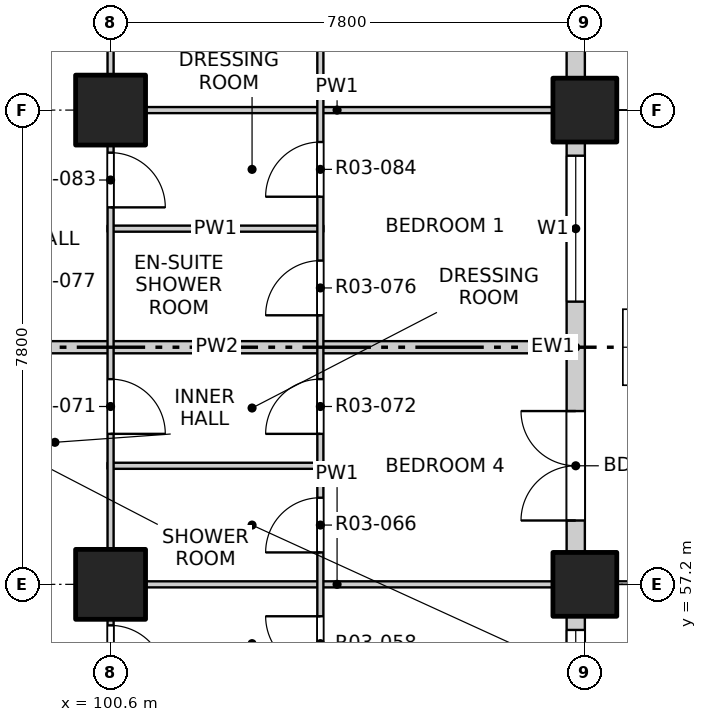
"""IFC4 building model, lengths in metres.
Left out: names, types, materials, properties, quantities, classifications, styles, units other than length and angle.
Written with IfcOpenShell. Run it as: python <this file> out.ifc"""

import sys

from ifc_helpers import new_model, si_unit, direction, frame, frame_2d, origin, origin_2d, place, context, subcontext, project, spatial, rectangle, extrude, element, fill, save


model = new_model("IFC4")
c1 = context("Model", 3, precision=1e-05, world=origin(), true_north=direction((0.0, 1.0)))
c2 = subcontext(c1, "Body", "Model", "MODEL_VIEW")
j1 = project(units=[si_unit("LENGTHUNIT", "METRE"), si_unit("PLANEANGLEUNIT", "RADIAN")], contexts=[c1])
p1 = place(None, origin())
s1 = spatial("IfcSite", under=j1, at=p1, CompositionType="ELEMENT")
p2 = place(p1, origin())
s2 = spatial("IfcBuilding", under=s1, at=p2, CompositionType="ELEMENT")
p3 = place(p2, frame((0.0, 0.0, 43.3)))
s3 = spatial("IfcBuildingStorey", under=s2, at=p3, CompositionType="ELEMENT", Elevation=43.3)
for number, where, z_axis, x_axis in (
    (1, (108.4, 57.2, -0.25), (0.0, 0.0, 1.0), (1.0, 0.0, 0.0)),
    (2, (108.4, 65.0, -0.25), (0.0, 0.0, 1.0), (1.0, 0.0, 0.0)),
):
    element("IfcColumn", number, at=place(p3, frame(where, z_axis=z_axis, x_axis=x_axis)), inside=s3, PredefinedType="COLUMN", context=c2, shape_type="SweptSolid", body=[
        extrude(rectangle(XDim=1.05, YDim=1.05, at=origin_2d()), origin(), (0.0, 0.0, 1.0), 3.35),
    ])
for number, where, z_axis, x_axis in (
    (3, (100.6, 57.2, -0.25), (0.0, 0.0, 1.0), (1.0, 0.0, 0.0)),
    (4, (100.6, 65.0, -0.25), (0.0, 0.0, 1.0), (1.0, 0.0, 0.0)),
):
    element("IfcColumn", number, at=place(p3, frame(where, z_axis=z_axis, x_axis=x_axis)), inside=s3, PredefinedType="COLUMN", context=c2, shape_type="SweptSolid", body=[
        extrude(rectangle(XDim=1.15, YDim=1.15, at=origin_2d()), origin(), (0.0, 0.0, 1.0), 3.35),
    ])
p4 = place(p3, frame((108.25, 49.925, 0.0), z_axis=(0.0, 0.0, 1.0), x_axis=(0.0, 1.0, 0.0)))
e5 = element("IfcWall", 5, at=p4, inside=s3, PredefinedType="SOLIDWALL", context=c2, shape_type="SweptSolid", body=[
    extrude(rectangle(XDim=6.75, YDim=0.3, at=frame_2d((3.375, 0.0))), origin(), (0.0, 0.0, 1.0), 3.1),
])
p5 = place(p4, frame((0.225, 0.0, 0.9)))
e6 = element("IfcOpeningElement", 6, at=p5, cuts=e5, PredefinedType="OPENING", context=c2, shape_type="SweptSolid", body=[
    extrude(rectangle(XDim=2.4, YDim=1.8, at=frame_2d((1.2, 0.9))), frame((0.0, 0.16, 0.0), z_axis=(0.0, -1.0, 0.0), x_axis=(1.0, 0.0, 0.0)), (0.0, 0.0, 1.0), 0.32),
])
p6 = place(p4, frame((4.125, 0.0, 0.9)))
e7 = element("IfcOpeningElement", 7, at=p6, cuts=e5, PredefinedType="OPENING", context=c2, shape_type="SweptSolid", body=[
    extrude(rectangle(XDim=2.4, YDim=1.8, at=frame_2d((1.2, 0.9))), frame((0.0, 0.16, 0.0), z_axis=(0.0, -1.0, 0.0), x_axis=(1.0, 0.0, 0.0)), (0.0, 0.0, 1.0), 0.32),
])
p7 = place(p3, frame((108.25, 57.725, 0.0), z_axis=(0.0, 0.0, 1.0), x_axis=(0.0, 1.0, 0.0)))
e8 = element("IfcWall", 8, at=p7, inside=s3, PredefinedType="SOLIDWALL", context=c2, shape_type="SweptSolid", body=[
    extrude(rectangle(XDim=6.75, YDim=0.3, at=frame_2d((3.375, 0.0))), origin(), (0.0, 0.0, 1.0), 3.1),
])
p8 = place(p7, frame((0.525, 0.0, 0.0)))
e9 = element("IfcOpeningElement", 9, at=p8, cuts=e8, PredefinedType="OPENING", context=c2, shape_type="SweptSolid", body=[
    extrude(rectangle(XDim=1.8, YDim=2.4, at=frame_2d((0.9, 1.2))), frame((0.0, 0.16, 0.0), z_axis=(0.0, -1.0, 0.0), x_axis=(1.0, 0.0, 0.0)), (0.0, 0.0, 1.0), 0.32),
])
p9 = place(p7, frame((4.125, 0.0, 0.9)))
e10 = element("IfcOpeningElement", 10, at=p9, cuts=e8, PredefinedType="OPENING", context=c2, shape_type="SweptSolid", body=[
    extrude(rectangle(XDim=2.4, YDim=1.8, at=frame_2d((1.2, 0.9))), frame((0.0, 0.16, 0.0), z_axis=(0.0, -1.0, 0.0), x_axis=(1.0, 0.0, 0.0)), (0.0, 0.0, 1.0), 0.32),
])
p10 = place(p3, frame((108.25, 65.525, 0.0), z_axis=(0.0, 0.0, 1.0), x_axis=(0.0, 1.0, 0.0)))
e11 = element("IfcWall", 11, at=p10, inside=s3, PredefinedType="SOLIDWALL", context=c2, shape_type="SweptSolid", body=[
    extrude(rectangle(XDim=6.75, YDim=0.3, at=frame_2d((3.375, 0.0))), origin(), (0.0, 0.0, 1.0), 3.1),
])
p11 = place(p10, frame((0.525, 0.0, 0.0)))
e12 = element("IfcOpeningElement", 12, at=p11, cuts=e11, PredefinedType="OPENING", context=c2, shape_type="SweptSolid", body=[
    extrude(rectangle(XDim=1.8, YDim=2.4, at=frame_2d((0.9, 1.2))), frame((0.0, 0.16, 0.0), z_axis=(0.0, -1.0, 0.0), x_axis=(1.0, 0.0, 0.0)), (0.0, 0.0, 1.0), 0.32),
])
p12 = place(p10, frame((4.125, 0.0, 0.9)))
e13 = element("IfcOpeningElement", 13, at=p12, cuts=e11, PredefinedType="OPENING", context=c2, shape_type="SweptSolid", body=[
    extrude(rectangle(XDim=2.4, YDim=1.8, at=frame_2d((1.2, 0.9))), frame((0.0, 0.16, 0.0), z_axis=(0.0, -1.0, 0.0), x_axis=(1.0, 0.0, 0.0)), (0.0, 0.0, 1.0), 0.32),
])
p13 = place(p3, frame((100.55, 57.2, 0.0), z_axis=(0.0, 0.0, 1.0), x_axis=(1.0, 0.0, 0.0)))
e14 = element("IfcWall", 14, at=p13, inside=s3, PredefinedType="PARTITIONING", context=c2, shape_type="SweptSolid", body=[
    extrude(rectangle(XDim=7.55, YDim=0.1, at=frame_2d((3.775, 0.0))), origin(), (0.0, 0.0, 1.0), 3.1),
])
p14 = place(p3, frame((100.55, 59.15, 0.0), z_axis=(0.0, 0.0, 1.0), x_axis=(1.0, 0.0, 0.0)))
e15 = element("IfcWall", 15, at=p14, inside=s3, PredefinedType="PARTITIONING", context=c2, shape_type="SweptSolid", body=[
    extrude(rectangle(XDim=3.55, YDim=0.1, at=frame_2d((1.775, 0.0))), origin(), (0.0, 0.0, 1.0), 3.1),
])
p15 = place(p3, frame((96.6, 61.1, 0.0), z_axis=(0.0, 0.0, 1.0), x_axis=(1.0, 0.0, 0.0)))
e16 = element("IfcWall", 16, at=p15, inside=s3, PredefinedType="PARTITIONING", context=c2, shape_type="SweptSolid", body=[
    extrude(rectangle(XDim=11.5, YDim=0.2, at=frame_2d((5.75, 0.0))), origin(), (0.0, 0.0, 1.0), 3.1),
])
p16 = place(p3, frame((100.55, 63.05, 0.0), z_axis=(0.0, 0.0, 1.0), x_axis=(1.0, 0.0, 0.0)))
e17 = element("IfcWall", 17, at=p16, inside=s3, PredefinedType="PARTITIONING", context=c2, shape_type="SweptSolid", body=[
    extrude(rectangle(XDim=3.55, YDim=0.1, at=frame_2d((1.775, 0.0))), origin(), (0.0, 0.0, 1.0), 3.1),
])
p17 = place(p3, frame((100.55, 65.0, 0.0), z_axis=(0.0, 0.0, 1.0), x_axis=(1.0, 0.0, 0.0)))
e18 = element("IfcWall", 18, at=p17, inside=s3, PredefinedType="PARTITIONING", context=c2, shape_type="SweptSolid", body=[
    extrude(rectangle(XDim=7.55, YDim=0.1, at=frame_2d((3.775, 0.0))), origin(), (0.0, 0.0, 1.0), 3.1),
])
p18 = place(p3, frame((100.6, 41.9, 0.0), z_axis=(0.0, 0.0, 1.0), x_axis=(0.0, 1.0, 0.0)))
e19 = element("IfcWall", 19, at=p18, inside=s3, PredefinedType="PARTITIONING", context=c2, shape_type="SweptSolid", body=[
    extrude(rectangle(XDim=46.2, YDim=0.1, at=frame_2d((23.1, 0.0))), origin(), (0.0, 0.0, 1.0), 3.1),
])
p19 = place(p18, frame((1.2, 0.0, 0.0)))
e20 = element("IfcOpeningElement", 20, at=p19, cuts=e19, PredefinedType="OPENING", context=c2, shape_type="SweptSolid", body=[
    extrude(rectangle(XDim=0.9, YDim=2.1, at=frame_2d((0.45, 1.05))), frame((0.0, 0.06, 0.0), z_axis=(0.0, -1.0, 0.0), x_axis=(1.0, 0.0, 0.0)), (0.0, 0.0, 1.0), 0.12),
])
p20 = place(p18, frame((5.9, 0.0, 0.0)))
e21 = element("IfcOpeningElement", 21, at=p20, cuts=e19, PredefinedType="OPENING", context=c2, shape_type="SweptSolid", body=[
    extrude(rectangle(XDim=0.9, YDim=2.1, at=frame_2d((0.45, 1.05))), frame((0.0, 0.06, 0.0), z_axis=(0.0, -1.0, 0.0), x_axis=(1.0, 0.0, 0.0)), (0.0, 0.0, 1.0), 0.12),
])
p21 = place(p18, frame((9.0, 0.0, 0.0)))
e22 = element("IfcOpeningElement", 22, at=p21, cuts=e19, PredefinedType="OPENING", context=c2, shape_type="SweptSolid", body=[
    extrude(rectangle(XDim=0.9, YDim=2.1, at=frame_2d((0.45, 1.05))), frame((0.0, 0.06, 0.0), z_axis=(0.0, -1.0, 0.0), x_axis=(1.0, 0.0, 0.0)), (0.0, 0.0, 1.0), 0.12),
])
p22 = place(p18, frame((13.725, 0.0, 0.0)))
e23 = element("IfcOpeningElement", 23, at=p22, cuts=e19, PredefinedType="OPENING", context=c2, shape_type="SweptSolid", body=[
    extrude(rectangle(XDim=0.9, YDim=2.1, at=frame_2d((0.45, 1.05))), frame((0.0, 0.06, 0.0), z_axis=(0.0, -1.0, 0.0), x_axis=(1.0, 0.0, 0.0)), (0.0, 0.0, 1.0), 0.12),
])
p23 = place(p18, frame((17.775, 0.0, 0.0)))
e24 = element("IfcOpeningElement", 24, at=p23, cuts=e19, PredefinedType="OPENING", context=c2, shape_type="SweptSolid", body=[
    extrude(rectangle(XDim=0.9, YDim=2.1, at=frame_2d((0.45, 1.05))), frame((0.0, 0.06, 0.0), z_axis=(0.0, -1.0, 0.0), x_axis=(1.0, 0.0, 0.0)), (0.0, 0.0, 1.0), 0.12),
])
p24 = place(p18, frame((21.5, 0.0, 0.0)))
e25 = element("IfcOpeningElement", 25, at=p24, cuts=e19, PredefinedType="OPENING", context=c2, shape_type="SweptSolid", body=[
    extrude(rectangle(XDim=0.9, YDim=2.1, at=frame_2d((0.45, 1.05))), frame((0.0, 0.06, 0.0), z_axis=(0.0, -1.0, 0.0), x_axis=(1.0, 0.0, 0.0)), (0.0, 0.0, 1.0), 0.12),
])
p25 = place(p18, frame((24.6, 0.0, 0.0)))
e26 = element("IfcOpeningElement", 26, at=p25, cuts=e19, PredefinedType="OPENING", context=c2, shape_type="SweptSolid", body=[
    extrude(rectangle(XDim=0.9, YDim=2.1, at=frame_2d((0.45, 1.05))), frame((0.0, 0.06, 0.0), z_axis=(0.0, -1.0, 0.0), x_axis=(1.0, 0.0, 0.0)), (0.0, 0.0, 1.0), 0.12),
])
p26 = place(p18, frame((28.5, 0.0, 0.0)))
e27 = element("IfcOpeningElement", 27, at=p26, cuts=e19, PredefinedType="OPENING", context=c2, shape_type="SweptSolid", body=[
    extrude(rectangle(XDim=0.9, YDim=2.1, at=frame_2d((0.45, 1.05))), frame((0.0, 0.06, 0.0), z_axis=(0.0, -1.0, 0.0), x_axis=(1.0, 0.0, 0.0)), (0.0, 0.0, 1.0), 0.12),
])
p27 = place(p18, frame((33.375, 0.0, 0.0)))
e28 = element("IfcOpeningElement", 28, at=p27, cuts=e19, PredefinedType="OPENING", context=c2, shape_type="SweptSolid", body=[
    extrude(rectangle(XDim=0.9, YDim=2.1, at=frame_2d((0.45, 1.05))), frame((0.0, 0.06, 0.0), z_axis=(0.0, -1.0, 0.0), x_axis=(1.0, 0.0, 0.0)), (0.0, 0.0, 1.0), 0.12),
])
p28 = place(p18, frame((37.1, 0.0, 0.0)))
e29 = element("IfcOpeningElement", 29, at=p28, cuts=e19, PredefinedType="OPENING", context=c2, shape_type="SweptSolid", body=[
    extrude(rectangle(XDim=0.9, YDim=2.1, at=frame_2d((0.45, 1.05))), frame((0.0, 0.06, 0.0), z_axis=(0.0, -1.0, 0.0), x_axis=(1.0, 0.0, 0.0)), (0.0, 0.0, 1.0), 0.12),
])
p29 = place(p18, frame((40.2, 0.0, 0.0)))
e30 = element("IfcOpeningElement", 30, at=p29, cuts=e19, PredefinedType="OPENING", context=c2, shape_type="SweptSolid", body=[
    extrude(rectangle(XDim=0.9, YDim=2.1, at=frame_2d((0.45, 1.05))), frame((0.0, 0.06, 0.0), z_axis=(0.0, -1.0, 0.0), x_axis=(1.0, 0.0, 0.0)), (0.0, 0.0, 1.0), 0.12),
])
p30 = place(p18, frame((44.1, 0.0, 0.0)))
e31 = element("IfcOpeningElement", 31, at=p30, cuts=e19, PredefinedType="OPENING", context=c2, shape_type="SweptSolid", body=[
    extrude(rectangle(XDim=0.9, YDim=2.1, at=frame_2d((0.45, 1.05))), frame((0.0, 0.06, 0.0), z_axis=(0.0, -1.0, 0.0), x_axis=(1.0, 0.0, 0.0)), (0.0, 0.0, 1.0), 0.12),
])
p31 = place(p3, frame((104.05, 41.9, 0.0), z_axis=(0.0, 0.0, 1.0), x_axis=(0.0, 1.0, 0.0)))
e32 = element("IfcWall", 32, at=p31, inside=s3, PredefinedType="PARTITIONING", context=c2, shape_type="SweptSolid", body=[
    extrude(rectangle(XDim=46.2, YDim=0.1, at=frame_2d((23.1, 0.0))), origin(), (0.0, 0.0, 1.0), 3.1),
])
p32 = place(p31, frame((1.05, 0.0, 0.0)))
e33 = element("IfcOpeningElement", 33, at=p32, cuts=e32, PredefinedType="OPENING", context=c2, shape_type="SweptSolid", body=[
    extrude(rectangle(XDim=1.2, YDim=2.1, at=frame_2d((0.6, 1.05))), frame((0.0, 0.06, 0.0), z_axis=(0.0, -1.0, 0.0), x_axis=(1.0, 0.0, 0.0)), (0.0, 0.0, 1.0), 0.12),
])
p33 = place(p31, frame((4.125, 0.0, 0.0)))
e34 = element("IfcOpeningElement", 34, at=p33, cuts=e32, PredefinedType="OPENING", context=c2, shape_type="SweptSolid", body=[
    extrude(rectangle(XDim=0.9, YDim=2.1, at=frame_2d((0.45, 1.05))), frame((0.0, 0.06, 0.0), z_axis=(0.0, -1.0, 0.0), x_axis=(1.0, 0.0, 0.0)), (0.0, 0.0, 1.0), 0.12),
])
p34 = place(p31, frame((6.075, 0.0, 0.0)))
e35 = element("IfcOpeningElement", 35, at=p34, cuts=e32, PredefinedType="OPENING", context=c2, shape_type="SweptSolid", body=[
    extrude(rectangle(XDim=0.9, YDim=2.1, at=frame_2d((0.45, 1.05))), frame((0.0, 0.06, 0.0), z_axis=(0.0, -1.0, 0.0), x_axis=(1.0, 0.0, 0.0)), (0.0, 0.0, 1.0), 0.12),
])
p35 = place(p31, frame((8.85, 0.0, 0.0)))
e36 = element("IfcOpeningElement", 36, at=p35, cuts=e32, PredefinedType="OPENING", context=c2, shape_type="SweptSolid", body=[
    extrude(rectangle(XDim=1.2, YDim=2.1, at=frame_2d((0.6, 1.05))), frame((0.0, 0.06, 0.0), z_axis=(0.0, -1.0, 0.0), x_axis=(1.0, 0.0, 0.0)), (0.0, 0.0, 1.0), 0.12),
])
p36 = place(p31, frame((11.925, 0.0, 0.0)))
e37 = element("IfcOpeningElement", 37, at=p36, cuts=e32, PredefinedType="OPENING", context=c2, shape_type="SweptSolid", body=[
    extrude(rectangle(XDim=0.9, YDim=2.1, at=frame_2d((0.45, 1.05))), frame((0.0, 0.06, 0.0), z_axis=(0.0, -1.0, 0.0), x_axis=(1.0, 0.0, 0.0)), (0.0, 0.0, 1.0), 0.12),
])
p37 = place(p31, frame((13.875, 0.0, 0.0)))
e38 = element("IfcOpeningElement", 38, at=p37, cuts=e32, PredefinedType="OPENING", context=c2, shape_type="SweptSolid", body=[
    extrude(rectangle(XDim=0.9, YDim=2.1, at=frame_2d((0.45, 1.05))), frame((0.0, 0.06, 0.0), z_axis=(0.0, -1.0, 0.0), x_axis=(1.0, 0.0, 0.0)), (0.0, 0.0, 1.0), 0.12),
])
p38 = place(p31, frame((15.825, 0.0, 0.0)))
e39 = element("IfcOpeningElement", 39, at=p38, cuts=e32, PredefinedType="OPENING", context=c2, shape_type="SweptSolid", body=[
    extrude(rectangle(XDim=0.9, YDim=2.1, at=frame_2d((0.45, 1.05))), frame((0.0, 0.06, 0.0), z_axis=(0.0, -1.0, 0.0), x_axis=(1.0, 0.0, 0.0)), (0.0, 0.0, 1.0), 0.12),
])
p39 = place(p31, frame((17.775, 0.0, 0.0)))
e40 = element("IfcOpeningElement", 40, at=p39, cuts=e32, PredefinedType="OPENING", context=c2, shape_type="SweptSolid", body=[
    extrude(rectangle(XDim=0.9, YDim=2.1, at=frame_2d((0.45, 1.05))), frame((0.0, 0.06, 0.0), z_axis=(0.0, -1.0, 0.0), x_axis=(1.0, 0.0, 0.0)), (0.0, 0.0, 1.0), 0.12),
])
p40 = place(p31, frame((19.725, 0.0, 0.0)))
e41 = element("IfcOpeningElement", 41, at=p40, cuts=e32, PredefinedType="OPENING", context=c2, shape_type="SweptSolid", body=[
    extrude(rectangle(XDim=0.9, YDim=2.1, at=frame_2d((0.45, 1.05))), frame((0.0, 0.06, 0.0), z_axis=(0.0, -1.0, 0.0), x_axis=(1.0, 0.0, 0.0)), (0.0, 0.0, 1.0), 0.12),
])
p41 = place(p31, frame((21.675, 0.0, 0.0)))
e42 = element("IfcOpeningElement", 42, at=p41, cuts=e32, PredefinedType="OPENING", context=c2, shape_type="SweptSolid", body=[
    extrude(rectangle(XDim=0.9, YDim=2.1, at=frame_2d((0.45, 1.05))), frame((0.0, 0.06, 0.0), z_axis=(0.0, -1.0, 0.0), x_axis=(1.0, 0.0, 0.0)), (0.0, 0.0, 1.0), 0.12),
])
p42 = place(p31, frame((24.45, 0.0, 0.0)))
e43 = element("IfcOpeningElement", 43, at=p42, cuts=e32, PredefinedType="OPENING", context=c2, shape_type="SweptSolid", body=[
    extrude(rectangle(XDim=1.2, YDim=2.1, at=frame_2d((0.6, 1.05))), frame((0.0, 0.06, 0.0), z_axis=(0.0, -1.0, 0.0), x_axis=(1.0, 0.0, 0.0)), (0.0, 0.0, 1.0), 0.12),
])
p43 = place(p31, frame((28.35, 0.0, 0.0)))
e44 = element("IfcOpeningElement", 44, at=p43, cuts=e32, PredefinedType="OPENING", context=c2, shape_type="SweptSolid", body=[
    extrude(rectangle(XDim=1.2, YDim=2.1, at=frame_2d((0.6, 1.05))), frame((0.0, 0.06, 0.0), z_axis=(0.0, -1.0, 0.0), x_axis=(1.0, 0.0, 0.0)), (0.0, 0.0, 1.0), 0.12),
])
p44 = place(p31, frame((31.425, 0.0, 0.0)))
e45 = element("IfcOpeningElement", 45, at=p44, cuts=e32, PredefinedType="OPENING", context=c2, shape_type="SweptSolid", body=[
    extrude(rectangle(XDim=0.9, YDim=2.1, at=frame_2d((0.45, 1.05))), frame((0.0, 0.06, 0.0), z_axis=(0.0, -1.0, 0.0), x_axis=(1.0, 0.0, 0.0)), (0.0, 0.0, 1.0), 0.12),
])
p45 = place(p31, frame((33.375, 0.0, 0.0)))
e46 = element("IfcOpeningElement", 46, at=p45, cuts=e32, PredefinedType="OPENING", context=c2, shape_type="SweptSolid", body=[
    extrude(rectangle(XDim=0.9, YDim=2.1, at=frame_2d((0.45, 1.05))), frame((0.0, 0.06, 0.0), z_axis=(0.0, -1.0, 0.0), x_axis=(1.0, 0.0, 0.0)), (0.0, 0.0, 1.0), 0.12),
])
p46 = place(p31, frame((35.325, 0.0, 0.0)))
e47 = element("IfcOpeningElement", 47, at=p46, cuts=e32, PredefinedType="OPENING", context=c2, shape_type="SweptSolid", body=[
    extrude(rectangle(XDim=0.9, YDim=2.1, at=frame_2d((0.45, 1.05))), frame((0.0, 0.06, 0.0), z_axis=(0.0, -1.0, 0.0), x_axis=(1.0, 0.0, 0.0)), (0.0, 0.0, 1.0), 0.12),
])
p47 = place(p31, frame((37.275, 0.0, 0.0)))
e48 = element("IfcOpeningElement", 48, at=p47, cuts=e32, PredefinedType="OPENING", context=c2, shape_type="SweptSolid", body=[
    extrude(rectangle(XDim=0.9, YDim=2.1, at=frame_2d((0.45, 1.05))), frame((0.0, 0.06, 0.0), z_axis=(0.0, -1.0, 0.0), x_axis=(1.0, 0.0, 0.0)), (0.0, 0.0, 1.0), 0.12),
])
p48 = place(p31, frame((40.05, 0.0, 0.0)))
e49 = element("IfcOpeningElement", 49, at=p48, cuts=e32, PredefinedType="OPENING", context=c2, shape_type="SweptSolid", body=[
    extrude(rectangle(XDim=1.2, YDim=2.1, at=frame_2d((0.6, 1.05))), frame((0.0, 0.06, 0.0), z_axis=(0.0, -1.0, 0.0), x_axis=(1.0, 0.0, 0.0)), (0.0, 0.0, 1.0), 0.12),
])
p49 = place(p31, frame((43.95, 0.0, 0.0)))
e50 = element("IfcOpeningElement", 50, at=p49, cuts=e32, PredefinedType="OPENING", context=c2, shape_type="SweptSolid", body=[
    extrude(rectangle(XDim=1.2, YDim=2.1, at=frame_2d((0.6, 1.05))), frame((0.0, 0.06, 0.0), z_axis=(0.0, -1.0, 0.0), x_axis=(1.0, 0.0, 0.0)), (0.0, 0.0, 1.0), 0.12),
])
p50 = place(p6, origin())
e51 = element("IfcWindow", 51, at=p50, inside=s3, PartitioningType="DOUBLE_PANEL_VERTICAL", PredefinedType="WINDOW", context=c2, shape_type="SweptSolid", body=[
    extrude(rectangle(XDim=2.4, YDim=1.8, at=frame_2d((1.2, 0.9))), frame((0.0, 0.03, 0.0), z_axis=(0.0, -1.0, 0.0), x_axis=(1.0, 0.0, 0.0)), (0.0, 0.0, 1.0), 0.06),
])
fill(e7, e51)
p51 = place(p8, origin())
e52 = element("IfcDoor", 52, at=p51, inside=s3, OperationType="DOUBLE_DOOR_SINGLE_SWING", PredefinedType="DOOR", context=c2, shape_type="SweptSolid", body=[
    extrude(rectangle(XDim=1.8, YDim=2.4, at=frame_2d((0.9, 1.2))), frame((0.0, 0.025, 0.0), z_axis=(0.0, -1.0, 0.0), x_axis=(1.0, 0.0, 0.0)), (0.0, 0.0, 1.0), 0.05),
])
fill(e9, e52)
p52 = place(p9, origin())
e53 = element("IfcWindow", 53, at=p52, inside=s3, PartitioningType="DOUBLE_PANEL_VERTICAL", PredefinedType="WINDOW", context=c2, shape_type="SweptSolid", body=[
    extrude(rectangle(XDim=2.4, YDim=1.8, at=frame_2d((1.2, 0.9))), frame((0.0, 0.03, 0.0), z_axis=(0.0, -1.0, 0.0), x_axis=(1.0, 0.0, 0.0)), (0.0, 0.0, 1.0), 0.06),
])
fill(e10, e53)
p53 = place(p22, origin())
e54 = element("IfcDoor", 54, at=p53, inside=s3, OperationType="SINGLE_SWING_RIGHT", PredefinedType="DOOR", context=c2, shape_type="SweptSolid", body=[
    extrude(rectangle(XDim=0.9, YDim=2.1, at=frame_2d((0.45, 1.05))), frame((0.0, 0.025, 0.0), z_axis=(0.0, -1.0, 0.0), x_axis=(1.0, 0.0, 0.0)), (0.0, 0.0, 1.0), 0.05),
])
fill(e23, e54)
p54 = place(p37, origin())
e55 = element("IfcDoor", 55, at=p54, inside=s3, OperationType="SINGLE_SWING_RIGHT", PredefinedType="DOOR", context=c2, shape_type="SweptSolid", body=[
    extrude(rectangle(XDim=0.9, YDim=2.1, at=frame_2d((0.45, 1.05))), frame((0.0, 0.025, 0.0), z_axis=(0.0, -1.0, 0.0), x_axis=(1.0, 0.0, 0.0)), (0.0, 0.0, 1.0), 0.05),
])
fill(e38, e55)
p55 = place(p38, origin())
e56 = element("IfcDoor", 56, at=p55, inside=s3, OperationType="SINGLE_SWING_LEFT", PredefinedType="DOOR", context=c2, shape_type="SweptSolid", body=[
    extrude(rectangle(XDim=0.9, YDim=2.1, at=frame_2d((0.45, 1.05))), frame((0.0, 0.025, 0.0), z_axis=(0.0, -1.0, 0.0), x_axis=(1.0, 0.0, 0.0)), (0.0, 0.0, 1.0), 0.05),
])
fill(e39, e56)
p56 = place(p23, origin())
e57 = element("IfcDoor", 57, at=p56, inside=s3, OperationType="SINGLE_SWING_RIGHT", PredefinedType="DOOR", context=c2, shape_type="SweptSolid", body=[
    extrude(rectangle(XDim=0.9, YDim=2.1, at=frame_2d((0.45, 1.05))), frame((0.0, 0.025, 0.0), z_axis=(0.0, -1.0, 0.0), x_axis=(1.0, 0.0, 0.0)), (0.0, 0.0, 1.0), 0.05),
])
fill(e24, e57)
p57 = place(p39, origin())
e58 = element("IfcDoor", 58, at=p57, inside=s3, OperationType="SINGLE_SWING_LEFT", PredefinedType="DOOR", context=c2, shape_type="SweptSolid", body=[
    extrude(rectangle(XDim=0.9, YDim=2.1, at=frame_2d((0.45, 1.05))), frame((0.0, 0.025, 0.0), z_axis=(0.0, -1.0, 0.0), x_axis=(1.0, 0.0, 0.0)), (0.0, 0.0, 1.0), 0.05),
])
fill(e40, e58)
p58 = place(p40, origin())
e59 = element("IfcDoor", 59, at=p58, inside=s3, OperationType="SINGLE_SWING_LEFT", PredefinedType="DOOR", context=c2, shape_type="SweptSolid", body=[
    extrude(rectangle(XDim=0.9, YDim=2.1, at=frame_2d((0.45, 1.05))), frame((0.0, 0.025, 0.0), z_axis=(0.0, -1.0, 0.0), x_axis=(1.0, 0.0, 0.0)), (0.0, 0.0, 1.0), 0.05),
])
fill(e41, e59)
p59 = place(p24, origin())
e60 = element("IfcDoor", 60, at=p59, inside=s3, OperationType="SINGLE_SWING_RIGHT", PredefinedType="DOOR", context=c2, shape_type="SweptSolid", body=[
    extrude(rectangle(XDim=0.9, YDim=2.1, at=frame_2d((0.45, 1.05))), frame((0.0, 0.025, 0.0), z_axis=(0.0, -1.0, 0.0), x_axis=(1.0, 0.0, 0.0)), (0.0, 0.0, 1.0), 0.05),
])
fill(e25, e60)
p60 = place(p41, origin())
e61 = element("IfcDoor", 61, at=p60, inside=s3, OperationType="SINGLE_SWING_LEFT", PredefinedType="DOOR", context=c2, shape_type="SweptSolid", body=[
    extrude(rectangle(XDim=0.9, YDim=2.1, at=frame_2d((0.45, 1.05))), frame((0.0, 0.025, 0.0), z_axis=(0.0, -1.0, 0.0), x_axis=(1.0, 0.0, 0.0)), (0.0, 0.0, 1.0), 0.05),
])
fill(e42, e61)
save(model, sys.argv[1])
